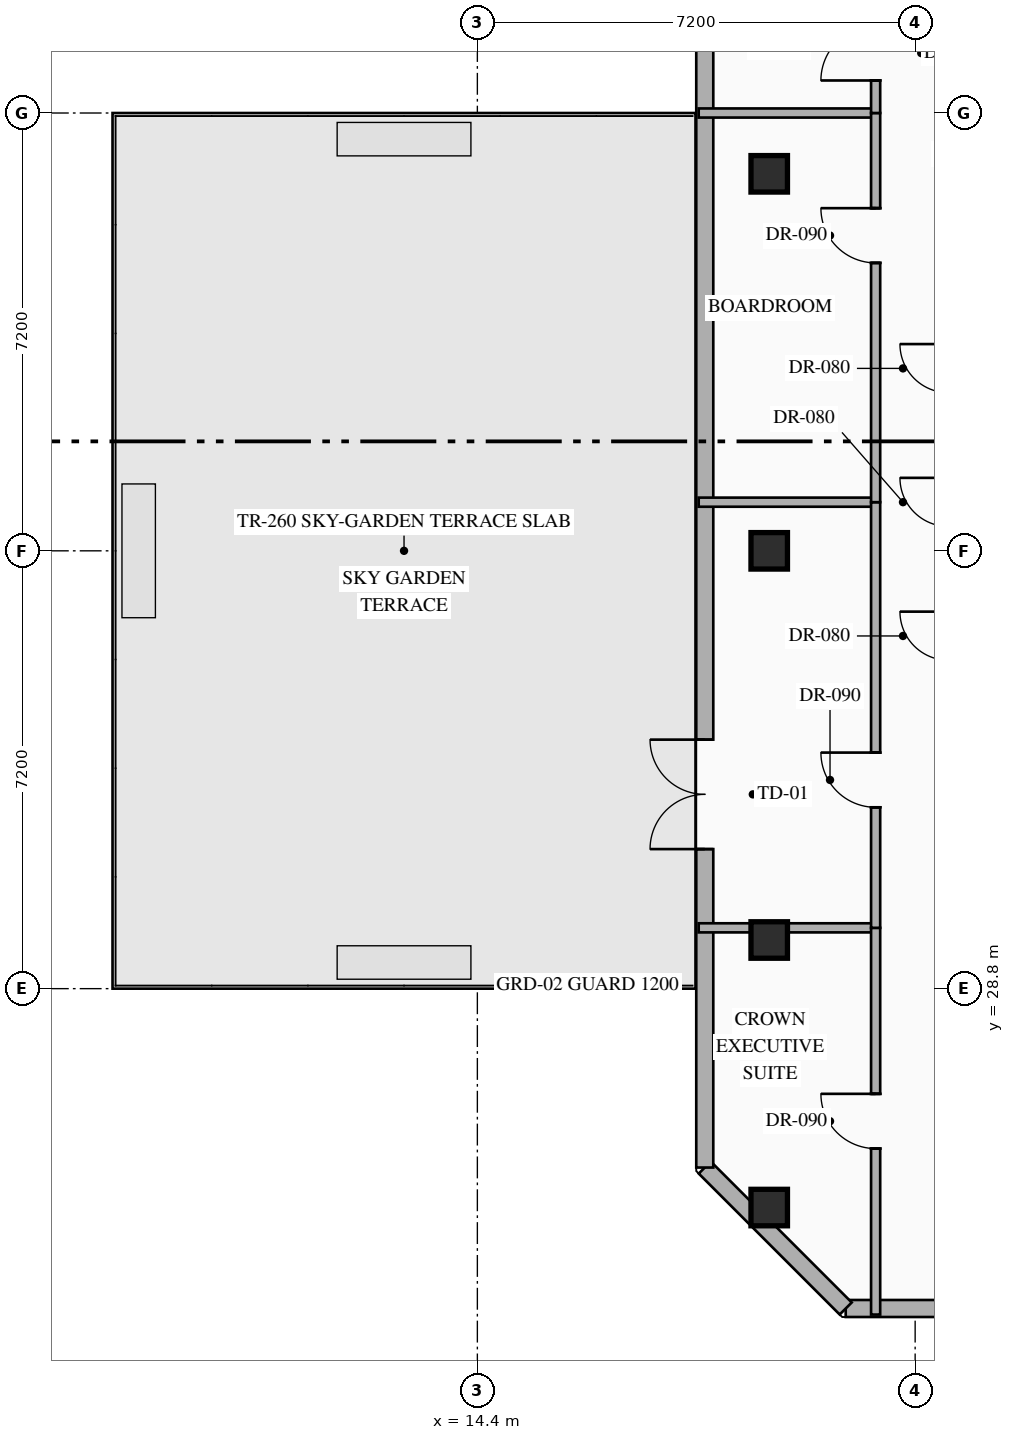
"""IFC4 building model, lengths in metres.
Left out: names, types, materials, properties, quantities, classifications, styles, units other than length and angle.
Written with IfcOpenShell. Run it as: python <this file> out.ifc"""

import sys

from ifc_helpers import new_model, si_unit, direction, frame, frame_2d, origin, origin_2d, place, context, subcontext, project, spatial, rectangle, hollow_rectangle, extrude, element, fill, save


model = new_model("IFC4")
c1 = context("Model", 3, precision=1e-05, world=origin(), true_north=direction((0.0, 1.0)))
c2 = subcontext(c1, "Body", "Model", "MODEL_VIEW")
j1 = project(units=[si_unit("LENGTHUNIT", "METRE"), si_unit("PLANEANGLEUNIT", "RADIAN")], contexts=[c1])
p1 = place(None, origin())
s1 = spatial("IfcSite", under=j1, at=p1, CompositionType="ELEMENT")
p2 = place(p1, origin())
s2 = spatial("IfcBuilding", under=s1, at=p2, CompositionType="ELEMENT")
p3 = place(p2, frame((0.0, 0.0, 265.95)))
s3 = spatial("IfcBuildingStorey", under=s2, at=p3, CompositionType="ELEMENT", Elevation=265.95)
for number, where, z_axis, x_axis in (
    (1, (19.2, 25.2, 0.0), (0.0, 0.0, 1.0), (1.0, 0.0, 0.0)),
    (2, (19.2, 29.6, 0.0), (0.0, 0.0, 1.0), (1.0, 0.0, 0.0)),
    (3, (19.2, 42.2, 0.0), (0.0, 0.0, 1.0), (1.0, 0.0, 0.0)),
    (4, (19.2, 36.0, 0.0), (0.0, 0.0, 1.0), (1.0, 0.0, 0.0)),
):
    element("IfcColumn", number, at=place(p3, frame(where, z_axis=z_axis, x_axis=x_axis)), inside=s3, PredefinedType="COLUMN", context=c2, shape_type="SweptSolid", body=[
        extrude(hollow_rectangle(XDim=0.6, YDim=0.6, WallThickness=0.025, at=origin_2d()), origin(), (0.0, 0.0, 1.0), 4.0),
    ])
p4 = place(p3, frame((25.247, 23.54, 0.0), z_axis=(0.0, 0.0, 1.0), x_axis=(-1.0, 0.0, 0.0)))
e5 = element("IfcWall", 5, at=p4, inside=s3, PredefinedType="STANDARD", context=c2, shape_type="SweptSolid", body=[
    extrude(rectangle(XDim=4.789, YDim=0.28, at=frame_2d((2.395, 0.0))), origin(), (0.0, 0.0, 1.0), 3.75),
])
p5 = place(p3, frame((20.458, 23.54, 0.0), z_axis=(0.0, 0.0, 1.0), x_axis=(-0.707144017911, 0.707069542501, 0.0)))
e6 = element("IfcWall", 6, at=p5, inside=s3, PredefinedType="STANDARD", context=c2, shape_type="SweptSolid", body=[
    extrude(rectangle(XDim=3.278, YDim=0.28, at=frame_2d((1.639, 0.0))), origin(), (0.0, 0.0, 1.0), 3.75),
])
p6 = place(p3, frame((18.14, 25.858, 0.0), z_axis=(0.0, 0.0, 1.0), x_axis=(0.0, 1.0, 0.0)))
e7 = element("IfcWall", 7, at=p6, inside=s3, PredefinedType="STANDARD", context=c2, shape_type="SweptSolid", body=[
    extrude(rectangle(XDim=19.684, YDim=0.28, at=frame_2d((9.842, 0.0))), origin(), (0.0, 0.0, 1.0), 3.75),
])
p7 = place(p6, frame((5.237, 0.0, 0.0)))
e8 = element("IfcOpeningElement", 8, at=p7, cuts=e7, PredefinedType="OPENING", context=c2, shape_type="SweptSolid", body=[
    extrude(rectangle(XDim=1.8, YDim=2.25, at=frame_2d((0.9, 1.125))), frame((0.0, 0.15, 0.0), z_axis=(0.0, -1.0, 0.0), x_axis=(1.0, 0.0, 0.0)), (0.0, 0.0, 1.0), 0.3),
])
p8 = place(p3, frame((18.04, 29.8, 0.0), z_axis=(0.0, 0.0, 1.0), x_axis=(1.0, 0.0, 0.0)))
e9 = element("IfcWall", 9, at=p8, inside=s3, PredefinedType="PARTITIONING", context=c2, shape_type="SweptSolid", body=[
    extrude(rectangle(XDim=2.91, YDim=0.15, at=frame_2d((1.455, 0.0))), origin(), (0.0, 0.0, 1.0), 3.75),
])
p9 = place(p3, frame((20.95, 23.44, 0.0), z_axis=(0.0, 0.0, 1.0), x_axis=(0.0, 1.0, 0.0)))
e10 = element("IfcWall", 10, at=p9, inside=s3, PredefinedType="PARTITIONING", context=c2, shape_type="SweptSolid", body=[
    extrude(rectangle(XDim=6.36, YDim=0.15, at=frame_2d((3.18, 0.0))), origin(), (0.0, 0.0, 1.0), 3.75),
])
p10 = place(p9, frame((2.73, 0.0, 0.0)))
e11 = element("IfcOpeningElement", 11, at=p10, cuts=e10, PredefinedType="OPENING", context=c2, shape_type="SweptSolid", body=[
    extrude(rectangle(XDim=0.9, YDim=2.15, at=frame_2d((0.45, 1.075))), frame((0.0, 0.085, 0.0), z_axis=(0.0, -1.0, 0.0), x_axis=(1.0, 0.0, 0.0)), (0.0, 0.0, 1.0), 0.17),
])
p11 = place(p3, frame((18.04, 36.8, 0.0), z_axis=(0.0, 0.0, 1.0), x_axis=(1.0, 0.0, 0.0)))
e12 = element("IfcWall", 12, at=p11, inside=s3, PredefinedType="PARTITIONING", context=c2, shape_type="SweptSolid", body=[
    extrude(rectangle(XDim=2.91, YDim=0.15, at=frame_2d((1.455, 0.0))), origin(), (0.0, 0.0, 1.0), 3.75),
])
p12 = place(p3, frame((20.95, 29.8, 0.0), z_axis=(0.0, 0.0, 1.0), x_axis=(0.0, 1.0, 0.0)))
e13 = element("IfcWall", 13, at=p12, inside=s3, PredefinedType="PARTITIONING", context=c2, shape_type="SweptSolid", body=[
    extrude(rectangle(XDim=7.0, YDim=0.15, at=frame_2d((3.5, 0.0))), origin(), (0.0, 0.0, 1.0), 3.75),
])
p13 = place(p12, frame((1.982, 0.0, 0.0)))
e14 = element("IfcOpeningElement", 14, at=p13, cuts=e13, PredefinedType="OPENING", context=c2, shape_type="SweptSolid", body=[
    extrude(rectangle(XDim=0.9, YDim=2.15, at=frame_2d((0.45, 1.075))), frame((0.0, 0.085, 0.0), z_axis=(0.0, -1.0, 0.0), x_axis=(1.0, 0.0, 0.0)), (0.0, 0.0, 1.0), 0.17),
])
p14 = place(p3, frame((18.04, 43.2, 0.0), z_axis=(0.0, 0.0, 1.0), x_axis=(1.0, 0.0, 0.0)))
e15 = element("IfcWall", 15, at=p14, inside=s3, PredefinedType="PARTITIONING", context=c2, shape_type="SweptSolid", body=[
    extrude(rectangle(XDim=2.91, YDim=0.15, at=frame_2d((1.455, 0.0))), origin(), (0.0, 0.0, 1.0), 3.75),
])
p15 = place(p3, frame((20.95, 36.8, 0.0), z_axis=(0.0, 0.0, 1.0), x_axis=(0.0, 1.0, 0.0)))
e16 = element("IfcWall", 16, at=p15, inside=s3, PredefinedType="PARTITIONING", context=c2, shape_type="SweptSolid", body=[
    extrude(rectangle(XDim=6.4, YDim=0.15, at=frame_2d((3.2, 0.0))), origin(), (0.0, 0.0, 1.0), 3.75),
])
p16 = place(p15, frame((3.935, 0.0, 0.0)))
e17 = element("IfcOpeningElement", 17, at=p16, cuts=e16, PredefinedType="OPENING", context=c2, shape_type="SweptSolid", body=[
    extrude(rectangle(XDim=0.9, YDim=2.15, at=frame_2d((0.45, 1.075))), frame((0.0, 0.085, 0.0), z_axis=(0.0, -1.0, 0.0), x_axis=(1.0, 0.0, 0.0)), (0.0, 0.0, 1.0), 0.17),
])
p17 = place(p3, frame((20.95, 43.2, 0.0), z_axis=(0.0, 0.0, 1.0), x_axis=(0.0, 1.0, 0.0)))
e18 = element("IfcWall", 18, at=p17, inside=s3, PredefinedType="PARTITIONING", context=c2, shape_type="SweptSolid", body=[
    extrude(rectangle(XDim=4.76, YDim=0.15, at=frame_2d((2.38, 0.0))), origin(), (0.0, 0.0, 1.0), 3.75),
])
p18 = place(p17, frame((0.535, 0.0, 0.0)))
e19 = element("IfcOpeningElement", 19, at=p18, cuts=e18, PredefinedType="OPENING", context=c2, shape_type="SweptSolid", body=[
    extrude(rectangle(XDim=0.9, YDim=2.15, at=frame_2d((0.45, 1.075))), frame((0.0, 0.085, 0.0), z_axis=(0.0, -1.0, 0.0), x_axis=(1.0, 0.0, 0.0)), (0.0, 0.0, 1.0), 0.17),
])
p19 = place(p7, origin())
e20 = element("IfcDoor", 20, at=p19, inside=s3, OperationType="DOUBLE_DOOR_SINGLE_SWING", PredefinedType="DOOR", context=c2, shape_type="SweptSolid", body=[
    extrude(rectangle(XDim=1.8, YDim=2.25, at=frame_2d((0.9, 1.125))), frame((0.0, 0.025, 0.0), z_axis=(0.0, -1.0, 0.0), x_axis=(1.0, 0.0, 0.0)), (0.0, 0.0, 1.0), 0.05),
])
fill(e8, e20)
p20 = place(p10, origin())
e21 = element("IfcDoor", 21, at=p20, inside=s3, OperationType="SINGLE_SWING_RIGHT", PredefinedType="DOOR", context=c2, shape_type="SweptSolid", body=[
    extrude(rectangle(XDim=0.9, YDim=2.15, at=frame_2d((0.45, 1.075))), frame((0.0, 0.025, 0.0), z_axis=(0.0, -1.0, 0.0), x_axis=(1.0, 0.0, 0.0)), (0.0, 0.0, 1.0), 0.05),
])
fill(e11, e21)
p21 = place(p13, origin())
e22 = element("IfcDoor", 22, at=p21, inside=s3, OperationType="SINGLE_SWING_RIGHT", PredefinedType="DOOR", context=c2, shape_type="SweptSolid", body=[
    extrude(rectangle(XDim=0.9, YDim=2.15, at=frame_2d((0.45, 1.075))), frame((0.0, 0.025, 0.0), z_axis=(0.0, -1.0, 0.0), x_axis=(1.0, 0.0, 0.0)), (0.0, 0.0, 1.0), 0.05),
])
fill(e14, e22)
p22 = place(p16, origin())
e23 = element("IfcDoor", 23, at=p22, inside=s3, OperationType="SINGLE_SWING_RIGHT", PredefinedType="DOOR", context=c2, shape_type="SweptSolid", body=[
    extrude(rectangle(XDim=0.9, YDim=2.15, at=frame_2d((0.45, 1.075))), frame((0.0, 0.025, 0.0), z_axis=(0.0, -1.0, 0.0), x_axis=(1.0, 0.0, 0.0)), (0.0, 0.0, 1.0), 0.05),
])
fill(e17, e23)
p23 = place(p18, origin())
e24 = element("IfcDoor", 24, at=p23, inside=s3, OperationType="SINGLE_SWING_LEFT", PredefinedType="DOOR", context=c2, shape_type="SweptSolid", body=[
    extrude(rectangle(XDim=0.9, YDim=2.15, at=frame_2d((0.45, 1.075))), frame((0.0, 0.025, 0.0), z_axis=(0.0, -1.0, 0.0), x_axis=(1.0, 0.0, 0.0)), (0.0, 0.0, 1.0), 0.05),
])
fill(e19, e24)
save(model, sys.argv[1])
